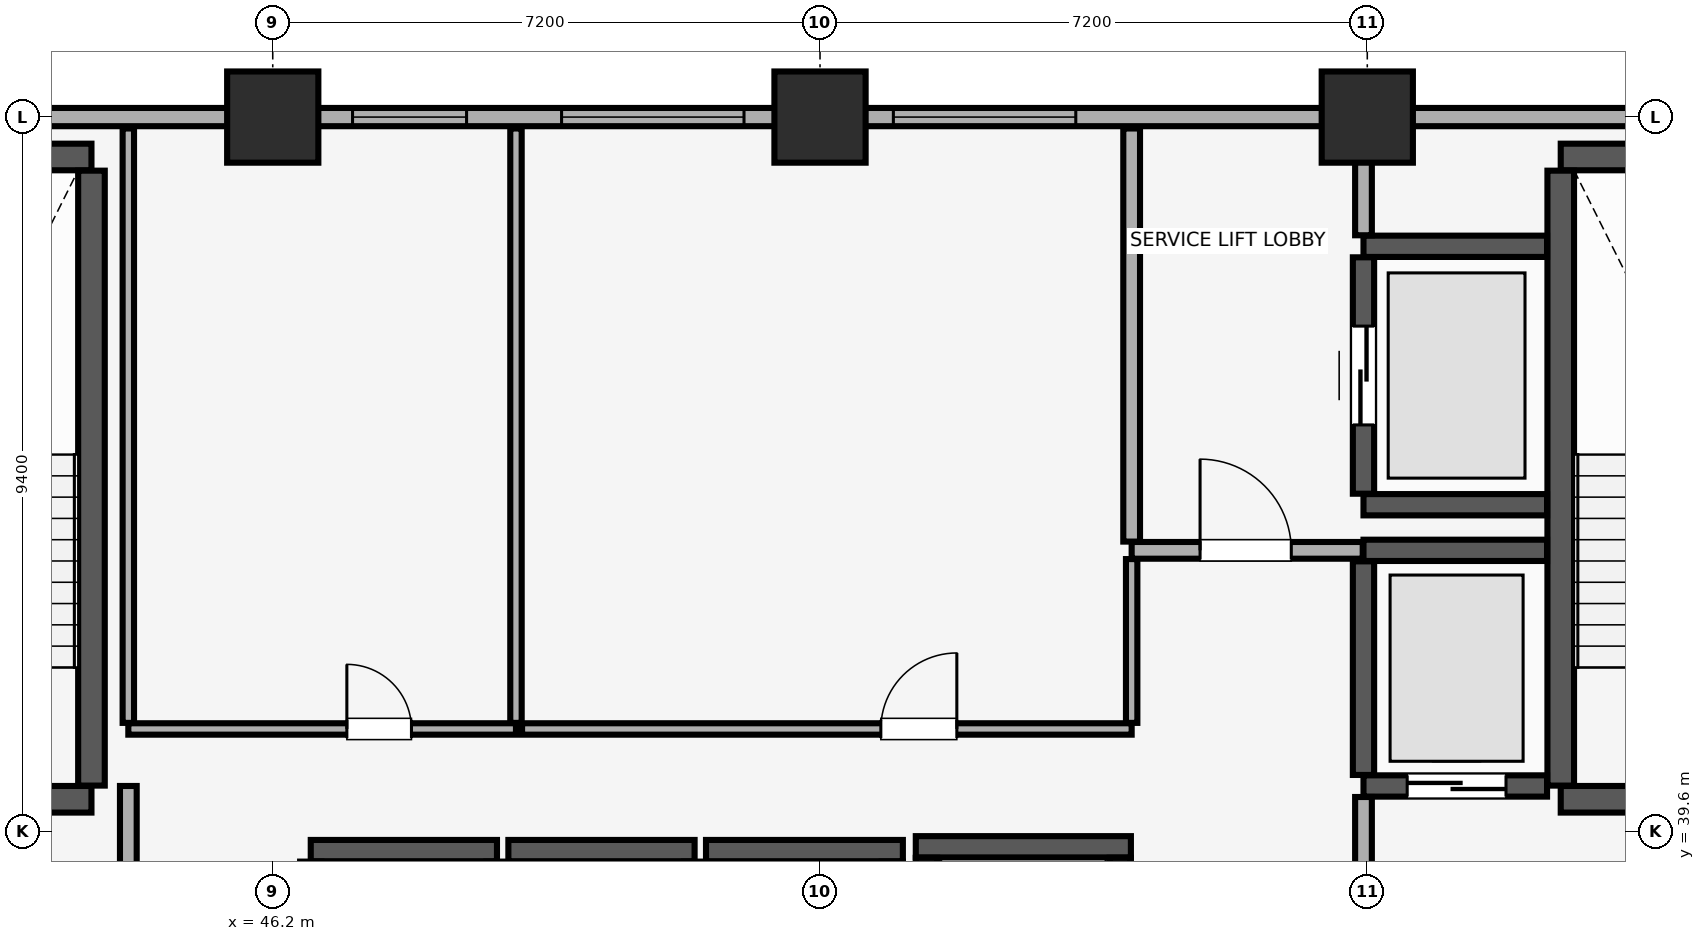
"""IFC4 building model, lengths in metres.
Left out: names, types, materials, properties, quantities, classifications, styles, units other than length and angle.
Written with IfcOpenShell. Run it as: python <this file> out.ifc"""

import sys

from ifc_helpers import new_model, si_unit, direction, frame, frame_2d, origin, origin_2d, place, context, subcontext, project, spatial, rectangle, extrude, element, fill, save


model = new_model("IFC4")
c1 = context("Model", 3, precision=1e-05, world=origin(), true_north=direction((0.0, 1.0)))
c2 = subcontext(c1, "Body", "Model", "MODEL_VIEW")
j1 = project(units=[si_unit("LENGTHUNIT", "METRE"), si_unit("PLANEANGLEUNIT", "RADIAN")], contexts=[c1])
p1 = place(None, origin())
s1 = spatial("IfcSite", under=j1, at=p1, CompositionType="ELEMENT")
p2 = place(p1, origin())
s2 = spatial("IfcBuilding", under=s1, at=p2, CompositionType="ELEMENT")
p3 = place(p2, frame((0.0, 0.0, 180.95)))
s3 = spatial("IfcBuildingStorey", under=s2, at=p3, CompositionType="ELEMENT", Elevation=180.95)
for number, where, z_axis, x_axis in (
    (1, (46.2, 49.0, 0.0), (0.0, 0.0, 1.0), (1.0, 0.0, 0.0)),
    (2, (53.4, 49.0, 0.0), (0.0, 0.0, 1.0), (1.0, 0.0, 0.0)),
    (3, (60.6, 49.0, 0.0), (0.0, 0.0, 1.0), (1.0, 0.0, 0.0)),
):
    element("IfcColumn", number, at=place(p3, frame(where, z_axis=z_axis, x_axis=x_axis)), inside=s3, PredefinedType="COLUMN", context=c2, shape_type="SweptSolid", body=[
        extrude(rectangle(XDim=1.2, YDim=1.2, at=origin_2d()), origin(), (0.0, 0.0, 1.0), 3.45),
    ])
p4 = place(p3, frame((77.0, 49.0, 0.0), z_axis=(0.0, 0.0, 1.0), x_axis=(-1.0, 0.0, 0.0)))
e4 = element("IfcWall", 4, at=p4, inside=s3, PredefinedType="SOLIDWALL", context=c2, shape_type="SweptSolid", body=[
    extrude(rectangle(XDim=70.0, YDim=0.24, at=frame_2d((35.0, 0.0))), origin(), (0.0, 0.0, 1.0), 2.65),
])
p5 = place(p4, frame((63.7, 0.0, 0.85)))
e5 = element("IfcOpeningElement", 5, at=p5, cuts=e4, PredefinedType="OPENING", context=c2, shape_type="SweptSolid", body=[
    extrude(rectangle(XDim=3.0, YDim=1.5, at=frame_2d((1.5, 0.75))), frame((0.0, 0.13, 0.0), z_axis=(0.0, -1.0, 0.0), x_axis=(1.0, 0.0, 0.0)), (0.0, 0.0, 1.0), 0.26),
])
p6 = place(p4, frame((3.3, 0.0, 0.85)))
e6 = element("IfcOpeningElement", 6, at=p6, cuts=e4, PredefinedType="OPENING", context=c2, shape_type="SweptSolid", body=[
    extrude(rectangle(XDim=3.0, YDim=1.5, at=frame_2d((1.5, 0.75))), frame((0.0, 0.13, 0.0), z_axis=(0.0, -1.0, 0.0), x_axis=(1.0, 0.0, 0.0)), (0.0, 0.0, 1.0), 0.26),
])
p7 = place(p4, frame((49.465, 0.0, 0.9)))
e7 = element("IfcOpeningElement", 7, at=p7, cuts=e4, PredefinedType="OPENING", context=c2, shape_type="SweptSolid", body=[
    extrude(rectangle(XDim=1.5, YDim=1.4, at=frame_2d((0.75, 0.7))), frame((0.0, 0.13, 0.0), z_axis=(0.0, -1.0, 0.0), x_axis=(1.0, 0.0, 0.0)), (0.0, 0.0, 1.0), 0.26),
])
p8 = place(p4, frame((41.65, 0.0, 0.9)))
e8 = element("IfcOpeningElement", 8, at=p8, cuts=e4, PredefinedType="OPENING", context=c2, shape_type="SweptSolid", body=[
    extrude(rectangle(XDim=3.6, YDim=1.5, at=frame_2d((1.8, 0.75))), frame((0.0, 0.13, 0.0), z_axis=(0.0, -1.0, 0.0), x_axis=(1.0, 0.0, 0.0)), (0.0, 0.0, 1.0), 0.26),
])
p9 = place(p4, frame((28.25, 0.0, 0.9)))
e9 = element("IfcOpeningElement", 9, at=p9, cuts=e4, PredefinedType="OPENING", context=c2, shape_type="SweptSolid", body=[
    extrude(rectangle(XDim=1.5, YDim=1.4, at=frame_2d((0.75, 0.7))), frame((0.0, 0.13, 0.0), z_axis=(0.0, -1.0, 0.0), x_axis=(1.0, 0.0, 0.0)), (0.0, 0.0, 1.0), 0.26),
])
p10 = place(p4, frame((24.6, 0.0, 0.9)))
e10 = element("IfcOpeningElement", 10, at=p10, cuts=e4, PredefinedType="OPENING", context=c2, shape_type="SweptSolid", body=[
    extrude(rectangle(XDim=2.4, YDim=1.5, at=frame_2d((1.2, 0.75))), frame((0.0, 0.13, 0.0), z_axis=(0.0, -1.0, 0.0), x_axis=(1.0, 0.0, 0.0)), (0.0, 0.0, 1.0), 0.26),
])
p11 = place(p4, frame((20.235, 0.0, 0.9)))
e11 = element("IfcOpeningElement", 11, at=p11, cuts=e4, PredefinedType="OPENING", context=c2, shape_type="SweptSolid", body=[
    extrude(rectangle(XDim=2.4, YDim=1.5, at=frame_2d((1.2, 0.75))), frame((0.0, 0.13, 0.0), z_axis=(0.0, -1.0, 0.0), x_axis=(1.0, 0.0, 0.0)), (0.0, 0.0, 1.0), 0.26),
])
p12 = place(p3, frame((40.185, 40.025, 0.0), z_axis=(0.0, 0.0, 1.0), x_axis=(1.0, 0.0, 0.0)))
e12 = element("IfcWall", 12, at=p12, inside=s3, PredefinedType="SHEAR", context=c2, shape_type="SweptSolid", body=[
    extrude(rectangle(XDim=3.63, YDim=0.35, at=frame_2d((1.815, 0.0))), origin(), (0.0, 0.0, 1.0), 3.45),
])
p13 = place(p12, frame((1.24, 0.0, 0.0)))
e13 = element("IfcOpeningElement", 13, at=p13, cuts=e12, PredefinedType="OPENING", context=c2, shape_type="SweptSolid", body=[
    extrude(rectangle(XDim=1.15, YDim=2.15, at=frame_2d((0.575, 1.075))), frame((0.0, 0.185, 0.0), z_axis=(0.0, -1.0, 0.0), x_axis=(1.0, 0.0, 0.0)), (0.0, 0.0, 1.0), 0.37),
])
p14 = place(p3, frame((40.185, 48.475, 0.0), z_axis=(0.0, 0.0, 1.0), x_axis=(1.0, 0.0, 0.0)))
e14 = element("IfcWall", 14, at=p14, inside=s3, PredefinedType="SHEAR", context=c2, shape_type="SweptSolid", body=[
    extrude(rectangle(XDim=3.63, YDim=0.35, at=frame_2d((1.815, 0.0))), origin(), (0.0, 0.0, 1.0), 3.45),
])
p15 = place(p3, frame((43.815, 40.205, 0.0), z_axis=(0.0, 0.0, 1.0), x_axis=(0.0, 1.0, 0.0)))
e15 = element("IfcWall", 15, at=p15, inside=s3, PredefinedType="SHEAR", context=c2, shape_type="SweptSolid", body=[
    extrude(rectangle(XDim=8.09, YDim=0.35, at=frame_2d((4.045, 0.0))), origin(), (0.0, 0.0, 1.0), 3.45),
])
p16 = place(p3, frame((63.145, 40.025, 0.0), z_axis=(0.0, 0.0, 1.0), x_axis=(1.0, 0.0, 0.0)))
e16 = element("IfcWall", 16, at=p16, inside=s3, PredefinedType="SHEAR", context=c2, shape_type="SweptSolid", body=[
    extrude(rectangle(XDim=4.2, YDim=0.35, at=frame_2d((2.1, 0.0))), origin(), (0.0, 0.0, 1.0), 3.45),
])
p17 = place(p16, frame((1.24, 0.0, 0.0)))
e17 = element("IfcOpeningElement", 17, at=p17, cuts=e16, PredefinedType="OPENING", context=c2, shape_type="SweptSolid", body=[
    extrude(rectangle(XDim=1.15, YDim=2.15, at=frame_2d((0.575, 1.075))), frame((0.0, 0.185, 0.0), z_axis=(0.0, -1.0, 0.0), x_axis=(1.0, 0.0, 0.0)), (0.0, 0.0, 1.0), 0.37),
])
p18 = place(p3, frame((63.145, 48.475, 0.0), z_axis=(0.0, 0.0, 1.0), x_axis=(1.0, 0.0, 0.0)))
e18 = element("IfcWall", 18, at=p18, inside=s3, PredefinedType="SHEAR", context=c2, shape_type="SweptSolid", body=[
    extrude(rectangle(XDim=4.05, YDim=0.35, at=frame_2d((2.025, 0.0))), origin(), (0.0, 0.0, 1.0), 3.45),
])
p19 = place(p3, frame((63.145, 40.205, 0.0), z_axis=(0.0, 0.0, 1.0), x_axis=(0.0, 1.0, 0.0)))
e19 = element("IfcWall", 19, at=p19, inside=s3, PredefinedType="SHEAR", context=c2, shape_type="SweptSolid", body=[
    extrude(rectangle(XDim=8.09, YDim=0.35, at=frame_2d((4.045, 0.0))), origin(), (0.0, 0.0, 1.0), 3.45),
])
p20 = place(p3, frame((46.7, 39.35, 0.0), z_axis=(0.0, 0.0, 1.0), x_axis=(1.0, 0.0, 0.0)))
e20 = element("IfcWall", 20, at=p20, inside=s3, PredefinedType="SHEAR", context=c2, shape_type="SweptSolid", body=[
    extrude(rectangle(XDim=2.45, YDim=0.28, at=frame_2d((1.225, 0.0))), origin(), (0.0, 0.0, 1.0), 3.45),
])
for number, where, z_axis, x_axis in (
    (21, (46.7, 37.145, 0.0), (0.0, 0.0, 1.0), (0.0, 1.0, 0.0)),
    (22, (49.15, 37.145, 0.0), (0.0, 0.0, 1.0), (0.0, 1.0, 0.0)),
):
    element("IfcWall", number, at=place(p3, frame(where, z_axis=z_axis, x_axis=x_axis)), inside=s3, PredefinedType="SHEAR", context=c2, shape_type="SweptSolid", body=[
        extrude(rectangle(XDim=2.06, YDim=0.28, at=frame_2d((1.03, 0.0))), origin(), (0.0, 0.0, 1.0), 3.45),
    ])
p21 = place(p3, frame((49.3, 39.35, 0.0), z_axis=(0.0, 0.0, 1.0), x_axis=(1.0, 0.0, 0.0)))
e23 = element("IfcWall", 23, at=p21, inside=s3, PredefinedType="SHEAR", context=c2, shape_type="SweptSolid", body=[
    extrude(rectangle(XDim=2.45, YDim=0.28, at=frame_2d((1.225, 0.0))), origin(), (0.0, 0.0, 1.0), 3.45),
])
p22 = place(p3, frame((51.75, 37.145, 0.0), z_axis=(0.0, 0.0, 1.0), x_axis=(0.0, 1.0, 0.0)))
e24 = element("IfcWall", 24, at=p22, inside=s3, PredefinedType="SHEAR", context=c2, shape_type="SweptSolid", body=[
    extrude(rectangle(XDim=2.06, YDim=0.28, at=frame_2d((1.03, 0.0))), origin(), (0.0, 0.0, 1.0), 3.45),
])
p23 = place(p3, frame((51.9, 39.35, 0.0), z_axis=(0.0, 0.0, 1.0), x_axis=(1.0, 0.0, 0.0)))
e25 = element("IfcWall", 25, at=p23, inside=s3, PredefinedType="SHEAR", context=c2, shape_type="SweptSolid", body=[
    extrude(rectangle(XDim=2.59, YDim=0.28, at=frame_2d((1.295, 0.0))), origin(), (0.0, 0.0, 1.0), 3.45),
])
p24 = place(p3, frame((54.35, 37.145, 0.0), z_axis=(0.0, 0.0, 1.0), x_axis=(0.0, 1.0, 0.0)))
e26 = element("IfcWall", 26, at=p24, inside=s3, PredefinedType="SHEAR", context=c2, shape_type="SweptSolid", body=[
    extrude(rectangle(XDim=2.06, YDim=0.28, at=frame_2d((1.03, 0.0))), origin(), (0.0, 0.0, 1.0), 3.45),
])
p25 = place(p3, frame((54.66, 39.4, 0.0), z_axis=(0.0, 0.0, 1.0), x_axis=(1.0, 0.0, 0.0)))
e27 = element("IfcWall", 27, at=p25, inside=s3, PredefinedType="SHEAR", context=c2, shape_type="SweptSolid", body=[
    extrude(rectangle(XDim=2.83, YDim=0.28, at=frame_2d((1.415, 0.0))), origin(), (0.0, 0.0, 1.0), 3.45),
])
for number, where, z_axis, x_axis in (
    (28, (54.8, 37.145, 0.0), (0.0, 0.0, 1.0), (0.0, 1.0, 0.0)),
    (29, (57.35, 37.145, 0.0), (0.0, 0.0, 1.0), (0.0, 1.0, 0.0)),
):
    element("IfcWall", number, at=place(p3, frame(where, z_axis=z_axis, x_axis=x_axis)), inside=s3, PredefinedType="SHEAR", context=c2, shape_type="SweptSolid", body=[
        extrude(rectangle(XDim=2.11, YDim=0.28, at=frame_2d((1.055, 0.0))), origin(), (0.0, 0.0, 1.0), 3.45),
    ])
p26 = place(p3, frame((60.55, 40.2, 0.0), z_axis=(0.0, 0.0, 1.0), x_axis=(1.0, 0.0, 0.0)))
e30 = element("IfcWall", 30, at=p26, inside=s3, PredefinedType="SHEAR", context=c2, shape_type="SweptSolid", body=[
    extrude(rectangle(XDim=2.415, YDim=0.28, at=frame_2d((1.208, 0.0))), origin(), (0.0, 0.0, 1.0), 3.45),
])
p27 = place(p26, frame((0.575, 0.0, 0.0)))
e31 = element("IfcOpeningElement", 31, at=p27, cuts=e30, PredefinedType="OPENING", context=c2, shape_type="SweptSolid", body=[
    extrude(rectangle(XDim=1.3, YDim=2.3, at=frame_2d((0.65, 1.15))), frame((0.0, 0.15, 0.0), z_axis=(0.0, -1.0, 0.0), x_axis=(1.0, 0.0, 0.0)), (0.0, 0.0, 1.0), 0.3),
])
p28 = place(p3, frame((60.55, 43.3, 0.0), z_axis=(0.0, 0.0, 1.0), x_axis=(1.0, 0.0, 0.0)))
e32 = element("IfcWall", 32, at=p28, inside=s3, PredefinedType="SHEAR", context=c2, shape_type="SweptSolid", body=[
    extrude(rectangle(XDim=2.415, YDim=0.28, at=frame_2d((1.208, 0.0))), origin(), (0.0, 0.0, 1.0), 3.45),
])
p29 = place(p3, frame((60.55, 40.345, 0.0), z_axis=(0.0, 0.0, 1.0), x_axis=(0.0, 1.0, 0.0)))
e33 = element("IfcWall", 33, at=p29, inside=s3, PredefinedType="SHEAR", context=c2, shape_type="SweptSolid", body=[
    extrude(rectangle(XDim=2.81, YDim=0.28, at=frame_2d((1.405, 0.0))), origin(), (0.0, 0.0, 1.0), 3.45),
])
for number, where, z_axis, x_axis in (
    (34, (60.55, 43.9, 0.0), (0.0, 0.0, 1.0), (1.0, 0.0, 0.0)),
    (35, (60.55, 47.3, 0.0), (0.0, 0.0, 1.0), (1.0, 0.0, 0.0)),
):
    element("IfcWall", number, at=place(p3, frame(where, z_axis=z_axis, x_axis=x_axis)), inside=s3, PredefinedType="SHEAR", context=c2, shape_type="SweptSolid", body=[
        extrude(rectangle(XDim=2.415, YDim=0.28, at=frame_2d((1.208, 0.0))), origin(), (0.0, 0.0, 1.0), 3.45),
    ])
p30 = place(p3, frame((60.55, 44.045, 0.0), z_axis=(0.0, 0.0, 1.0), x_axis=(0.0, 1.0, 0.0)))
e36 = element("IfcWall", 36, at=p30, inside=s3, PredefinedType="SHEAR", context=c2, shape_type="SweptSolid", body=[
    extrude(rectangle(XDim=3.11, YDim=0.28, at=frame_2d((1.555, 0.0))), origin(), (0.0, 0.0, 1.0), 3.45),
])
p31 = place(p30, frame((0.905, 0.0, 0.0)))
e37 = element("IfcOpeningElement", 37, at=p31, cuts=e36, PredefinedType="OPENING", context=c2, shape_type="SweptSolid", body=[
    extrude(rectangle(XDim=1.3, YDim=2.3, at=frame_2d((0.65, 1.15))), frame((0.0, 0.15, 0.0), z_axis=(0.0, -1.0, 0.0), x_axis=(1.0, 0.0, 0.0)), (0.0, 0.0, 1.0), 0.3),
])
p32 = place(p3, frame((60.55, 34.415, 0.0), z_axis=(0.0, 0.0, 1.0), x_axis=(0.0, 1.0, 0.0)))
e38 = element("IfcWall", 38, at=p32, inside=s3, PredefinedType="PARTITIONING", context=c2, shape_type="SweptSolid", body=[
    extrude(rectangle(XDim=5.64, YDim=0.22, at=frame_2d((2.82, 0.0))), origin(), (0.0, 0.0, 1.0), 3.45),
])
p33 = place(p3, frame((44.3, 34.415, 0.0), z_axis=(0.0, 0.0, 1.0), x_axis=(0.0, 1.0, 0.0)))
e39 = element("IfcWall", 39, at=p33, inside=s3, PredefinedType="PARTITIONING", context=c2, shape_type="SweptSolid", body=[
    extrude(rectangle(XDim=5.785, YDim=0.22, at=frame_2d((2.893, 0.0))), origin(), (0.0, 0.0, 1.0), 3.45),
])
p34 = place(p3, frame((57.5, 43.3, 0.0), z_axis=(0.0, 0.0, 1.0), x_axis=(1.0, 0.0, 0.0)))
e40 = element("IfcWall", 40, at=p34, inside=s3, PredefinedType="PARTITIONING", context=c2, shape_type="SweptSolid", body=[
    extrude(rectangle(XDim=3.04, YDim=0.22, at=frame_2d((1.52, 0.0))), origin(), (0.0, 0.0, 1.0), 3.45),
])
p35 = place(p34, frame((0.9, 0.0, 0.0)))
e41 = element("IfcOpeningElement", 41, at=p35, cuts=e40, PredefinedType="OPENING", context=c2, shape_type="SweptSolid", body=[
    extrude(rectangle(XDim=1.2, YDim=2.15, at=frame_2d((0.6, 1.075))), frame((0.0, 0.12, 0.0), z_axis=(0.0, -1.0, 0.0), x_axis=(1.0, 0.0, 0.0)), (0.0, 0.0, 1.0), 0.24),
])
p36 = place(p3, frame((57.5, 43.415, 0.0), z_axis=(0.0, 0.0, 1.0), x_axis=(0.0, 1.0, 0.0)))
e42 = element("IfcWall", 42, at=p36, inside=s3, PredefinedType="PARTITIONING", context=c2, shape_type="SweptSolid", body=[
    extrude(rectangle(XDim=5.435, YDim=0.22, at=frame_2d((2.718, 0.0))), origin(), (0.0, 0.0, 1.0), 3.45),
])
p37 = place(p3, frame((60.55, 47.445, 0.0), z_axis=(0.0, 0.0, 1.0), x_axis=(0.0, 1.0, 0.0)))
e43 = element("IfcWall", 43, at=p37, inside=s3, PredefinedType="PARTITIONING", context=c2, shape_type="SweptSolid", body=[
    extrude(rectangle(XDim=1.405, YDim=0.22, at=frame_2d((0.703, 0.0))), origin(), (0.0, 0.0, 1.0), 3.45),
])
p38 = place(p3, frame((44.3, 40.95, 0.0), z_axis=(0.0, 0.0, 1.0), x_axis=(1.0, 0.0, 0.0)))
e44 = element("IfcWall", 44, at=p38, inside=s3, PredefinedType="PARTITIONING", context=c2, shape_type="SweptSolid", body=[
    extrude(rectangle(XDim=5.1, YDim=0.15, at=frame_2d((2.55, 0.0))), origin(), (0.0, 0.0, 1.0), 3.45),
])
p39 = place(p38, frame((2.875, 0.0, 0.0)))
e45 = element("IfcOpeningElement", 45, at=p39, cuts=e44, PredefinedType="OPENING", context=c2, shape_type="SweptSolid", body=[
    extrude(rectangle(XDim=0.85, YDim=2.1, at=frame_2d((0.425, 1.05))), frame((0.0, 0.085, 0.0), z_axis=(0.0, -1.0, 0.0), x_axis=(1.0, 0.0, 0.0)), (0.0, 0.0, 1.0), 0.17),
])
for number, where, z_axis, x_axis in (
    (46, (44.3, 41.03, 0.0), (0.0, 0.0, 1.0), (0.0, 1.0, 0.0)),
    (47, (49.4, 41.03, 0.0), (0.0, 0.0, 1.0), (0.0, 1.0, 0.0)),
):
    element("IfcWall", number, at=place(p3, frame(where, z_axis=z_axis, x_axis=x_axis)), inside=s3, PredefinedType="PARTITIONING", context=c2, shape_type="SweptSolid", body=[
        extrude(rectangle(XDim=7.82, YDim=0.15, at=frame_2d((3.91, 0.0))), origin(), (0.0, 0.0, 1.0), 3.45),
    ])
p40 = place(p3, frame((49.48, 40.95, 0.0), z_axis=(0.0, 0.0, 1.0), x_axis=(1.0, 0.0, 0.0)))
e48 = element("IfcWall", 48, at=p40, inside=s3, PredefinedType="PARTITIONING", context=c2, shape_type="SweptSolid", body=[
    extrude(rectangle(XDim=8.02, YDim=0.15, at=frame_2d((4.01, 0.0))), origin(), (0.0, 0.0, 1.0), 3.45),
])
p41 = place(p40, frame((4.72, 0.0, 0.0)))
e49 = element("IfcOpeningElement", 49, at=p41, cuts=e48, PredefinedType="OPENING", context=c2, shape_type="SweptSolid", body=[
    extrude(rectangle(XDim=1.0, YDim=2.15, at=frame_2d((0.5, 1.075))), frame((0.0, 0.085, 0.0), z_axis=(0.0, -1.0, 0.0), x_axis=(1.0, 0.0, 0.0)), (0.0, 0.0, 1.0), 0.17),
])
p42 = place(p3, frame((57.5, 41.03, 0.0), z_axis=(0.0, 0.0, 1.0), x_axis=(0.0, 1.0, 0.0)))
e50 = element("IfcWall", 50, at=p42, inside=s3, PredefinedType="PARTITIONING", context=c2, shape_type="SweptSolid", body=[
    extrude(rectangle(XDim=2.155, YDim=0.15, at=frame_2d((1.078, 0.0))), origin(), (0.0, 0.0, 1.0), 3.45),
])
p43 = place(p9, origin())
e51 = element("IfcWindow", 51, at=p43, inside=s3, PartitioningType="SINGLE_PANEL", PredefinedType="WINDOW", context=c2, shape_type="SweptSolid", body=[
    extrude(rectangle(XDim=1.5, YDim=1.4, at=frame_2d((0.75, 0.7))), frame((0.0, 0.03, 0.0), z_axis=(0.0, -1.0, 0.0), x_axis=(1.0, 0.0, 0.0)), (0.0, 0.0, 1.0), 0.06),
])
fill(e9, e51)
p44 = place(p10, origin())
e52 = element("IfcWindow", 52, at=p44, inside=s3, PartitioningType="SINGLE_PANEL", PredefinedType="WINDOW", context=c2, shape_type="SweptSolid", body=[
    extrude(rectangle(XDim=2.4, YDim=1.5, at=frame_2d((1.2, 0.75))), frame((0.0, 0.03, 0.0), z_axis=(0.0, -1.0, 0.0), x_axis=(1.0, 0.0, 0.0)), (0.0, 0.0, 1.0), 0.06),
])
fill(e10, e52)
p45 = place(p11, origin())
e53 = element("IfcWindow", 53, at=p45, inside=s3, PartitioningType="SINGLE_PANEL", PredefinedType="WINDOW", context=c2, shape_type="SweptSolid", body=[
    extrude(rectangle(XDim=2.4, YDim=1.5, at=frame_2d((1.2, 0.75))), frame((0.0, 0.03, 0.0), z_axis=(0.0, -1.0, 0.0), x_axis=(1.0, 0.0, 0.0)), (0.0, 0.0, 1.0), 0.06),
])
fill(e11, e53)
p46 = place(p27, origin())
e54 = element("IfcDoor", 54, at=p46, inside=s3, OperationType="DOUBLE_DOOR_SLIDING", PredefinedType="DOOR", context=c2, shape_type="SweptSolid", body=[
    extrude(rectangle(XDim=1.3, YDim=2.3, at=frame_2d((0.65, 1.15))), frame((0.0, 0.025, 0.0), z_axis=(0.0, -1.0, 0.0), x_axis=(1.0, 0.0, 0.0)), (0.0, 0.0, 1.0), 0.05),
])
fill(e31, e54)
p47 = place(p31, origin())
e55 = element("IfcDoor", 55, at=p47, inside=s3, OperationType="DOUBLE_DOOR_SLIDING", PredefinedType="DOOR", context=c2, shape_type="SweptSolid", body=[
    extrude(rectangle(XDim=1.3, YDim=2.3, at=frame_2d((0.65, 1.15))), frame((0.0, 0.025, 0.0), z_axis=(0.0, -1.0, 0.0), x_axis=(1.0, 0.0, 0.0)), (0.0, 0.0, 1.0), 0.05),
])
fill(e37, e55)
p48 = place(p35, origin())
e56 = element("IfcDoor", 56, at=p48, inside=s3, OperationType="SINGLE_SWING_LEFT", PredefinedType="DOOR", context=c2, shape_type="SweptSolid", body=[
    extrude(rectangle(XDim=1.2, YDim=2.15, at=frame_2d((0.6, 1.075))), frame((0.0, 0.025, 0.0), z_axis=(0.0, -1.0, 0.0), x_axis=(1.0, 0.0, 0.0)), (0.0, 0.0, 1.0), 0.05),
])
fill(e41, e56)
p49 = place(p39, origin())
e57 = element("IfcDoor", 57, at=p49, inside=s3, OperationType="SINGLE_SWING_LEFT", PredefinedType="DOOR", context=c2, shape_type="SweptSolid", body=[
    extrude(rectangle(XDim=0.85, YDim=2.1, at=frame_2d((0.425, 1.05))), frame((0.0, 0.025, 0.0), z_axis=(0.0, -1.0, 0.0), x_axis=(1.0, 0.0, 0.0)), (0.0, 0.0, 1.0), 0.05),
])
fill(e45, e57)
p50 = place(p41, origin())
e58 = element("IfcDoor", 58, at=p50, inside=s3, OperationType="SINGLE_SWING_RIGHT", PredefinedType="DOOR", context=c2, shape_type="SweptSolid", body=[
    extrude(rectangle(XDim=1.0, YDim=2.15, at=frame_2d((0.5, 1.075))), frame((0.0, 0.025, 0.0), z_axis=(0.0, -1.0, 0.0), x_axis=(1.0, 0.0, 0.0)), (0.0, 0.0, 1.0), 0.05),
])
fill(e49, e58)
save(model, sys.argv[1])
